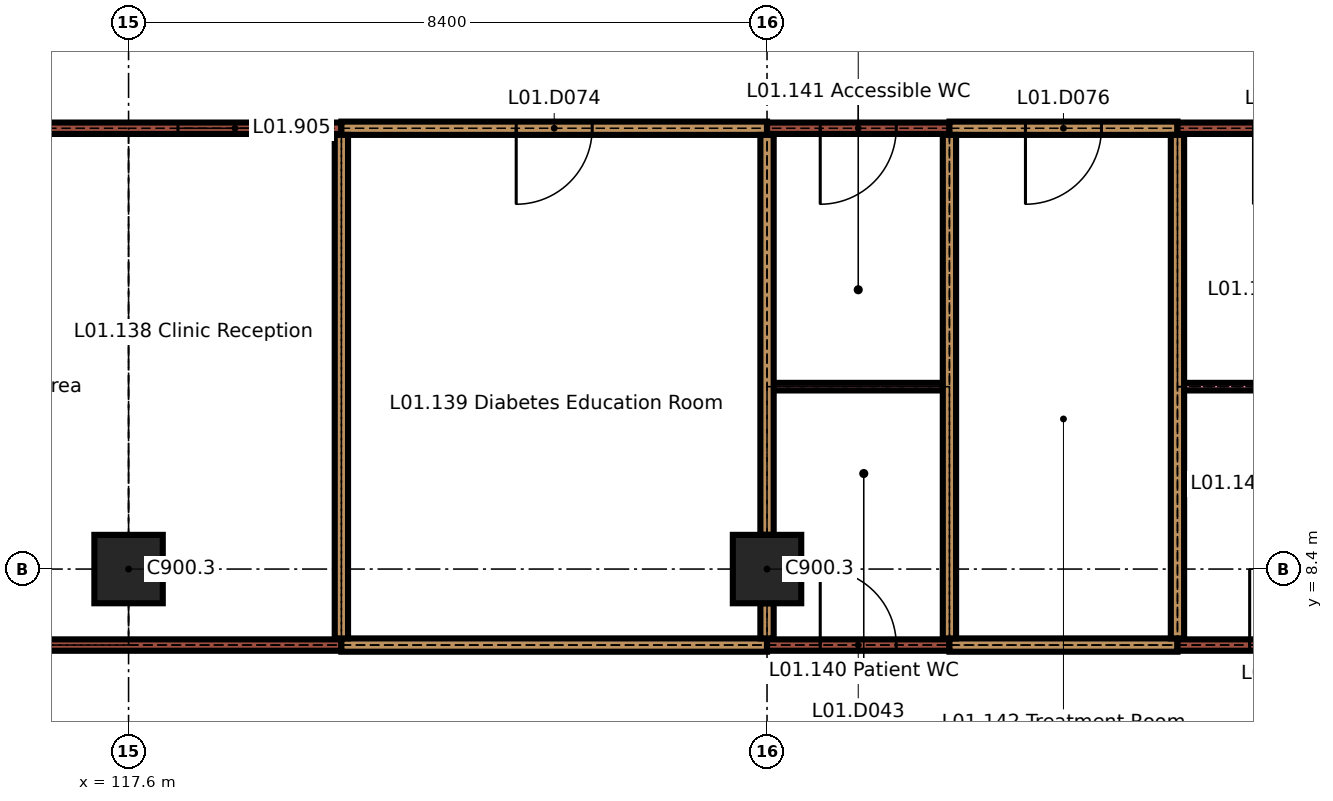
"""IFC4 building model, lengths in metres.
Left out: names, types, materials, properties, quantities, classifications, styles, units other than length and angle.
Written with IfcOpenShell. Run it as: python <this file> out.ifc"""

import sys

from ifc_helpers import new_model, si_unit, direction, frame, frame_2d, origin, origin_2d, place, context, subcontext, project, spatial, rectangle, extrude, element, fill, save


model = new_model("IFC4")
c1 = context("Model", 3, precision=1e-05, world=origin(), true_north=direction((0.0, 1.0)))
c2 = subcontext(c1, "Body", "Model", "MODEL_VIEW")
j1 = project(units=[si_unit("LENGTHUNIT", "METRE"), si_unit("PLANEANGLEUNIT", "RADIAN")], contexts=[c1])
p1 = place(None, origin())
s1 = spatial("IfcSite", under=j1, at=p1, CompositionType="ELEMENT")
p2 = place(p1, origin())
s2 = spatial("IfcBuilding", under=s1, at=p2, CompositionType="ELEMENT")
p3 = place(p2, frame((0.0, 0.0, 4.5)))
s3 = spatial("IfcBuildingStorey", under=s2, at=p3, CompositionType="ELEMENT", Elevation=4.5)
for number, where, z_axis, x_axis in (
    (1, (117.6, 8.4, 0.0), (0.0, 0.0, 1.0), (1.0, 0.0, 0.0)),
    (2, (126.0, 8.4, 0.0), (0.0, 0.0, 1.0), (1.0, 0.0, 0.0)),
):
    element("IfcColumn", number, at=place(p3, frame(where, z_axis=z_axis, x_axis=x_axis)), inside=s3, PredefinedType="COLUMN", context=c2, shape_type="SweptSolid", body=[
        extrude(rectangle(XDim=0.9, YDim=0.9, at=origin_2d()), origin(), (0.0, 0.0, 1.0), 3.45),
    ])
p4 = place(p3, frame((109.3, 7.4, 0.0), z_axis=(0.0, 0.0, 1.0), x_axis=(1.0, 0.0, 0.0)))
e3 = element("IfcWall", 3, at=p4, inside=s3, PredefinedType="PARTITIONING", context=c2, shape_type="SweptSolid", body=[
    extrude(rectangle(XDim=11.1, YDim=0.15, at=frame_2d((5.55, 0.0))), origin(), (0.0, 0.0, 1.0), 3.45),
])
p5 = place(p4, frame((3.45, 0.0, 0.0)))
e4 = element("IfcOpeningElement", 4, at=p5, cuts=e3, PredefinedType="OPENING", context=c2, shape_type="SweptSolid", body=[
    extrude(rectangle(XDim=1.4, YDim=2.1, at=frame_2d((0.7, 1.05))), frame((0.0, 0.085, 0.0), z_axis=(0.0, -1.0, 0.0), x_axis=(1.0, 0.0, 0.0)), (0.0, 0.0, 1.0), 0.17),
])
p6 = place(p3, frame((120.4, 7.4, 0.0), z_axis=(0.0, 0.0, 1.0), x_axis=(1.0, 0.0, 0.0)))
e5 = element("IfcWall", 5, at=p6, inside=s3, PredefinedType="PARTITIONING", context=c2, shape_type="SweptSolid", body=[
    extrude(rectangle(XDim=5.6, YDim=0.175, at=frame_2d((2.8, 0.0))), origin(), (0.0, 0.0, 1.0), 3.45),
])
p7 = place(p3, frame((126.0, 7.4, 0.0), z_axis=(0.0, 0.0, 1.0), x_axis=(1.0, 0.0, 0.0)))
e6 = element("IfcWall", 6, at=p7, inside=s3, PredefinedType="PARTITIONING", context=c2, shape_type="SweptSolid", body=[
    extrude(rectangle(XDim=2.4, YDim=0.15, at=frame_2d((1.2, 0.0))), origin(), (0.0, 0.0, 1.0), 3.45),
])
p8 = place(p7, frame((0.7, 0.0, 0.0)))
e7 = element("IfcOpeningElement", 7, at=p8, cuts=e6, PredefinedType="OPENING", context=c2, shape_type="SweptSolid", body=[
    extrude(rectangle(XDim=1.0, YDim=2.1, at=frame_2d((0.5, 1.05))), frame((0.0, 0.085, 0.0), z_axis=(0.0, -1.0, 0.0), x_axis=(1.0, 0.0, 0.0)), (0.0, 0.0, 1.0), 0.17),
])
p9 = place(p3, frame((128.4, 7.4, 0.0), z_axis=(0.0, 0.0, 1.0), x_axis=(1.0, 0.0, 0.0)))
e8 = element("IfcWall", 8, at=p9, inside=s3, PredefinedType="PARTITIONING", context=c2, shape_type="SweptSolid", body=[
    extrude(rectangle(XDim=3.0, YDim=0.175, at=frame_2d((1.5, 0.0))), origin(), (0.0, 0.0, 1.0), 3.45),
])
p10 = place(p3, frame((131.4, 7.4, 0.0), z_axis=(0.0, 0.0, 1.0), x_axis=(1.0, 0.0, 0.0)))
e9 = element("IfcWall", 9, at=p10, inside=s3, PredefinedType="PARTITIONING", context=c2, shape_type="SweptSolid", body=[
    extrude(rectangle(XDim=2.9, YDim=0.15, at=frame_2d((1.45, 0.0))), origin(), (0.0, 0.0, 1.0), 3.45),
])
p11 = place(p10, frame((0.95, 0.0, 0.0)))
e10 = element("IfcOpeningElement", 10, at=p11, cuts=e9, PredefinedType="OPENING", context=c2, shape_type="SweptSolid", body=[
    extrude(rectangle(XDim=1.0, YDim=2.1, at=frame_2d((0.5, 1.05))), frame((0.0, 0.085, 0.0), z_axis=(0.0, -1.0, 0.0), x_axis=(1.0, 0.0, 0.0)), (0.0, 0.0, 1.0), 0.17),
])
p12 = place(p3, frame((126.087, 10.8, 0.0), z_axis=(0.0, 0.0, 1.0), x_axis=(1.0, 0.0, 0.0)))
e11 = element("IfcWall", 11, at=p12, inside=s3, PredefinedType="PARTITIONING", context=c2, shape_type="SweptSolid", body=[
    extrude(rectangle(XDim=2.225, YDim=0.1, at=frame_2d((1.113, 0.0))), origin(), (0.0, 0.0, 1.0), 3.45),
])
p13 = place(p3, frame((131.488, 10.8, 0.0), z_axis=(0.0, 0.0, 1.0), x_axis=(1.0, 0.0, 0.0)))
e12 = element("IfcWall", 12, at=p13, inside=s3, PredefinedType="PARTITIONING", context=c2, shape_type="SweptSolid", body=[
    extrude(rectangle(XDim=2.837, YDim=0.1, at=frame_2d((1.419, 0.0))), origin(), (0.0, 0.0, 1.0), 3.45),
])
p14 = place(p3, frame((100.8, 14.2, 0.0), z_axis=(0.0, 0.0, 1.0), x_axis=(1.0, 0.0, 0.0)))
e13 = element("IfcWall", 13, at=p14, inside=s3, PredefinedType="PARTITIONING", context=c2, shape_type="SweptSolid", body=[
    extrude(rectangle(XDim=19.6, YDim=0.15, at=frame_2d((9.8, 0.0))), origin(), (0.0, 0.0, 1.0), 3.45),
])
p15 = place(p14, frame((3.5, 0.0, 0.0)))
e14 = element("IfcOpeningElement", 14, at=p15, cuts=e13, PredefinedType="OPENING", context=c2, shape_type="SweptSolid", body=[
    extrude(rectangle(XDim=1.4, YDim=2.1, at=frame_2d((0.7, 1.05))), frame((0.0, 0.085, 0.0), z_axis=(0.0, -1.0, 0.0), x_axis=(1.0, 0.0, 0.0)), (0.0, 0.0, 1.0), 0.17),
])
p16 = place(p14, frame((11.9, 0.0, 0.0)))
e15 = element("IfcOpeningElement", 15, at=p16, cuts=e13, PredefinedType="OPENING", context=c2, shape_type="SweptSolid", body=[
    extrude(rectangle(XDim=1.4, YDim=2.1, at=frame_2d((0.7, 1.05))), frame((0.0, 0.085, 0.0), z_axis=(0.0, -1.0, 0.0), x_axis=(1.0, 0.0, 0.0)), (0.0, 0.0, 1.0), 0.17),
])
p17 = place(p14, frame((17.45, 0.0, 0.9)))
e16 = element("IfcOpeningElement", 16, at=p17, cuts=e13, PredefinedType="OPENING", context=c2, shape_type="SweptSolid", body=[
    extrude(rectangle(XDim=1.5, YDim=1.0, at=frame_2d((0.75, 0.5))), frame((0.0, 0.085, 0.0), z_axis=(0.0, -1.0, 0.0), x_axis=(1.0, 0.0, 0.0)), (0.0, 0.0, 1.0), 0.17),
])
p18 = place(p3, frame((120.4, 14.2, 0.0), z_axis=(0.0, 0.0, 1.0), x_axis=(1.0, 0.0, 0.0)))
e17 = element("IfcWall", 17, at=p18, inside=s3, PredefinedType="PARTITIONING", context=c2, shape_type="SweptSolid", body=[
    extrude(rectangle(XDim=5.6, YDim=0.175, at=frame_2d((2.8, 0.0))), origin(), (0.0, 0.0, 1.0), 3.45),
])
p19 = place(p18, frame((2.3, 0.0, 0.0)))
e18 = element("IfcOpeningElement", 18, at=p19, cuts=e17, PredefinedType="OPENING", context=c2, shape_type="SweptSolid", body=[
    extrude(rectangle(XDim=1.0, YDim=2.1, at=frame_2d((0.5, 1.05))), frame((0.0, 0.097, 0.0), z_axis=(0.0, -1.0, 0.0), x_axis=(1.0, 0.0, 0.0)), (0.0, 0.0, 1.0), 0.195),
])
p20 = place(p3, frame((126.0, 14.2, 0.0), z_axis=(0.0, 0.0, 1.0), x_axis=(1.0, 0.0, 0.0)))
e19 = element("IfcWall", 19, at=p20, inside=s3, PredefinedType="PARTITIONING", context=c2, shape_type="SweptSolid", body=[
    extrude(rectangle(XDim=2.4, YDim=0.15, at=frame_2d((1.2, 0.0))), origin(), (0.0, 0.0, 1.0), 3.45),
])
p21 = place(p20, frame((0.7, 0.0, 0.0)))
e20 = element("IfcOpeningElement", 20, at=p21, cuts=e19, PredefinedType="OPENING", context=c2, shape_type="SweptSolid", body=[
    extrude(rectangle(XDim=1.0, YDim=2.1, at=frame_2d((0.5, 1.05))), frame((0.0, 0.085, 0.0), z_axis=(0.0, -1.0, 0.0), x_axis=(1.0, 0.0, 0.0)), (0.0, 0.0, 1.0), 0.17),
])
p22 = place(p3, frame((128.4, 14.2, 0.0), z_axis=(0.0, 0.0, 1.0), x_axis=(1.0, 0.0, 0.0)))
e21 = element("IfcWall", 21, at=p22, inside=s3, PredefinedType="PARTITIONING", context=c2, shape_type="SweptSolid", body=[
    extrude(rectangle(XDim=3.0, YDim=0.175, at=frame_2d((1.5, 0.0))), origin(), (0.0, 0.0, 1.0), 3.45),
])
p23 = place(p22, frame((1.0, 0.0, 0.0)))
e22 = element("IfcOpeningElement", 22, at=p23, cuts=e21, PredefinedType="OPENING", context=c2, shape_type="SweptSolid", body=[
    extrude(rectangle(XDim=1.0, YDim=2.1, at=frame_2d((0.5, 1.05))), frame((0.0, 0.097, 0.0), z_axis=(0.0, -1.0, 0.0), x_axis=(1.0, 0.0, 0.0)), (0.0, 0.0, 1.0), 0.195),
])
p24 = place(p3, frame((131.4, 14.2, 0.0), z_axis=(0.0, 0.0, 1.0), x_axis=(1.0, 0.0, 0.0)))
e23 = element("IfcWall", 23, at=p24, inside=s3, PredefinedType="PARTITIONING", context=c2, shape_type="SweptSolid", body=[
    extrude(rectangle(XDim=11.275, YDim=0.15, at=frame_2d((5.638, 0.0))), origin(), (0.0, 0.0, 1.0), 3.45),
])
p25 = place(p24, frame((1.0, 0.0, 0.0)))
e24 = element("IfcOpeningElement", 24, at=p25, cuts=e23, PredefinedType="OPENING", context=c2, shape_type="SweptSolid", body=[
    extrude(rectangle(XDim=1.0, YDim=2.1, at=frame_2d((0.5, 1.05))), frame((0.0, 0.085, 0.0), z_axis=(0.0, -1.0, 0.0), x_axis=(1.0, 0.0, 0.0)), (0.0, 0.0, 1.0), 0.17),
])
p26 = place(p24, frame((6.438, 0.0, 0.0)))
e25 = element("IfcOpeningElement", 25, at=p26, cuts=e23, PredefinedType="OPENING", context=c2, shape_type="SweptSolid", body=[
    extrude(rectangle(XDim=1.4, YDim=2.1, at=frame_2d((0.7, 1.05))), frame((0.0, 0.085, 0.0), z_axis=(0.0, -1.0, 0.0), x_axis=(1.0, 0.0, 0.0)), (0.0, 0.0, 1.0), 0.17),
])
p27 = place(p3, frame((120.4, 7.488, 0.0), z_axis=(0.0, 0.0, 1.0), x_axis=(0.0, 1.0, 0.0)))
e26 = element("IfcWall", 26, at=p27, inside=s3, PredefinedType="PARTITIONING", context=c2, shape_type="SweptSolid", body=[
    extrude(rectangle(XDim=6.625, YDim=0.175, at=frame_2d((3.312, 0.0))), origin(), (0.0, 0.0, 1.0), 3.45),
])
p28 = place(p3, frame((126.0, 7.488, 0.0), z_axis=(0.0, 0.0, 1.0), x_axis=(0.0, 1.0, 0.0)))
e27 = element("IfcWall", 27, at=p28, inside=s3, PredefinedType="PARTITIONING", context=c2, shape_type="SweptSolid", body=[
    extrude(rectangle(XDim=0.462, YDim=0.175, at=frame_2d((0.231, 0.0))), origin(), (0.0, 0.0, 1.0), 3.45),
])
p29 = place(p3, frame((126.0, 8.85, 0.0), z_axis=(0.0, 0.0, 1.0), x_axis=(0.0, 1.0, 0.0)))
e28 = element("IfcWall", 28, at=p29, inside=s3, PredefinedType="PARTITIONING", context=c2, shape_type="SweptSolid", body=[
    extrude(rectangle(XDim=5.262, YDim=0.175, at=frame_2d((2.631, 0.0))), origin(), (0.0, 0.0, 1.0), 3.45),
])
for number, where, z_axis, x_axis in (
    (29, (128.4, 7.488, 0.0), (0.0, 0.0, 1.0), (0.0, 1.0, 0.0)),
    (30, (131.4, 7.488, 0.0), (0.0, 0.0, 1.0), (0.0, 1.0, 0.0)),
):
    element("IfcWall", number, at=place(p3, frame(where, z_axis=z_axis, x_axis=x_axis)), inside=s3, PredefinedType="PARTITIONING", context=c2, shape_type="SweptSolid", body=[
        extrude(rectangle(XDim=6.625, YDim=0.175, at=frame_2d((3.312, 0.0))), origin(), (0.0, 0.0, 1.0), 3.45),
    ])
p30 = place(p8, origin())
e31 = element("IfcDoor", 31, at=p30, inside=s3, OperationType="SINGLE_SWING_RIGHT", PredefinedType="DOOR", context=c2, shape_type="SweptSolid", body=[
    extrude(rectangle(XDim=1.0, YDim=2.1, at=frame_2d((0.5, 1.05))), frame((0.0, 0.025, 0.0), z_axis=(0.0, -1.0, 0.0), x_axis=(1.0, 0.0, 0.0)), (0.0, 0.0, 1.0), 0.05),
])
fill(e7, e31)
p31 = place(p11, origin())
e32 = element("IfcDoor", 32, at=p31, inside=s3, OperationType="SINGLE_SWING_RIGHT", PredefinedType="DOOR", context=c2, shape_type="SweptSolid", body=[
    extrude(rectangle(XDim=1.0, YDim=2.1, at=frame_2d((0.5, 1.05))), frame((0.0, 0.025, 0.0), z_axis=(0.0, -1.0, 0.0), x_axis=(1.0, 0.0, 0.0)), (0.0, 0.0, 1.0), 0.05),
])
fill(e10, e32)
p32 = place(p19, origin())
e33 = element("IfcDoor", 33, at=p32, inside=s3, OperationType="SINGLE_SWING_LEFT", PredefinedType="DOOR", context=c2, shape_type="SweptSolid", body=[
    extrude(rectangle(XDim=1.0, YDim=2.1, at=frame_2d((0.5, 1.05))), frame((0.0, 0.035, 0.0), z_axis=(0.0, -1.0, 0.0), x_axis=(1.0, 0.0, 0.0)), (0.0, 0.0, 1.0), 0.07),
])
fill(e18, e33)
p33 = place(p21, origin())
e34 = element("IfcDoor", 34, at=p33, inside=s3, OperationType="SINGLE_SWING_LEFT", PredefinedType="DOOR", context=c2, shape_type="SweptSolid", body=[
    extrude(rectangle(XDim=1.0, YDim=2.1, at=frame_2d((0.5, 1.05))), frame((0.0, 0.025, 0.0), z_axis=(0.0, -1.0, 0.0), x_axis=(1.0, 0.0, 0.0)), (0.0, 0.0, 1.0), 0.05),
])
fill(e20, e34)
p34 = place(p23, origin())
e35 = element("IfcDoor", 35, at=p34, inside=s3, OperationType="SINGLE_SWING_LEFT", PredefinedType="DOOR", context=c2, shape_type="SweptSolid", body=[
    extrude(rectangle(XDim=1.0, YDim=2.1, at=frame_2d((0.5, 1.05))), frame((0.0, 0.035, 0.0), z_axis=(0.0, -1.0, 0.0), x_axis=(1.0, 0.0, 0.0)), (0.0, 0.0, 1.0), 0.07),
])
fill(e22, e35)
p35 = place(p17, origin())
e36 = element("IfcWindow", 36, at=p35, inside=s3, PartitioningType="DOUBLE_PANEL_HORIZONTAL", PredefinedType="WINDOW", context=c2, shape_type="SweptSolid", body=[
    extrude(rectangle(XDim=1.5, YDim=1.0, at=frame_2d((0.75, 0.5))), frame((0.0, 0.025, 0.0), z_axis=(0.0, -1.0, 0.0), x_axis=(1.0, 0.0, 0.0)), (0.0, 0.0, 1.0), 0.05),
])
fill(e16, e36)
save(model, sys.argv[1])
